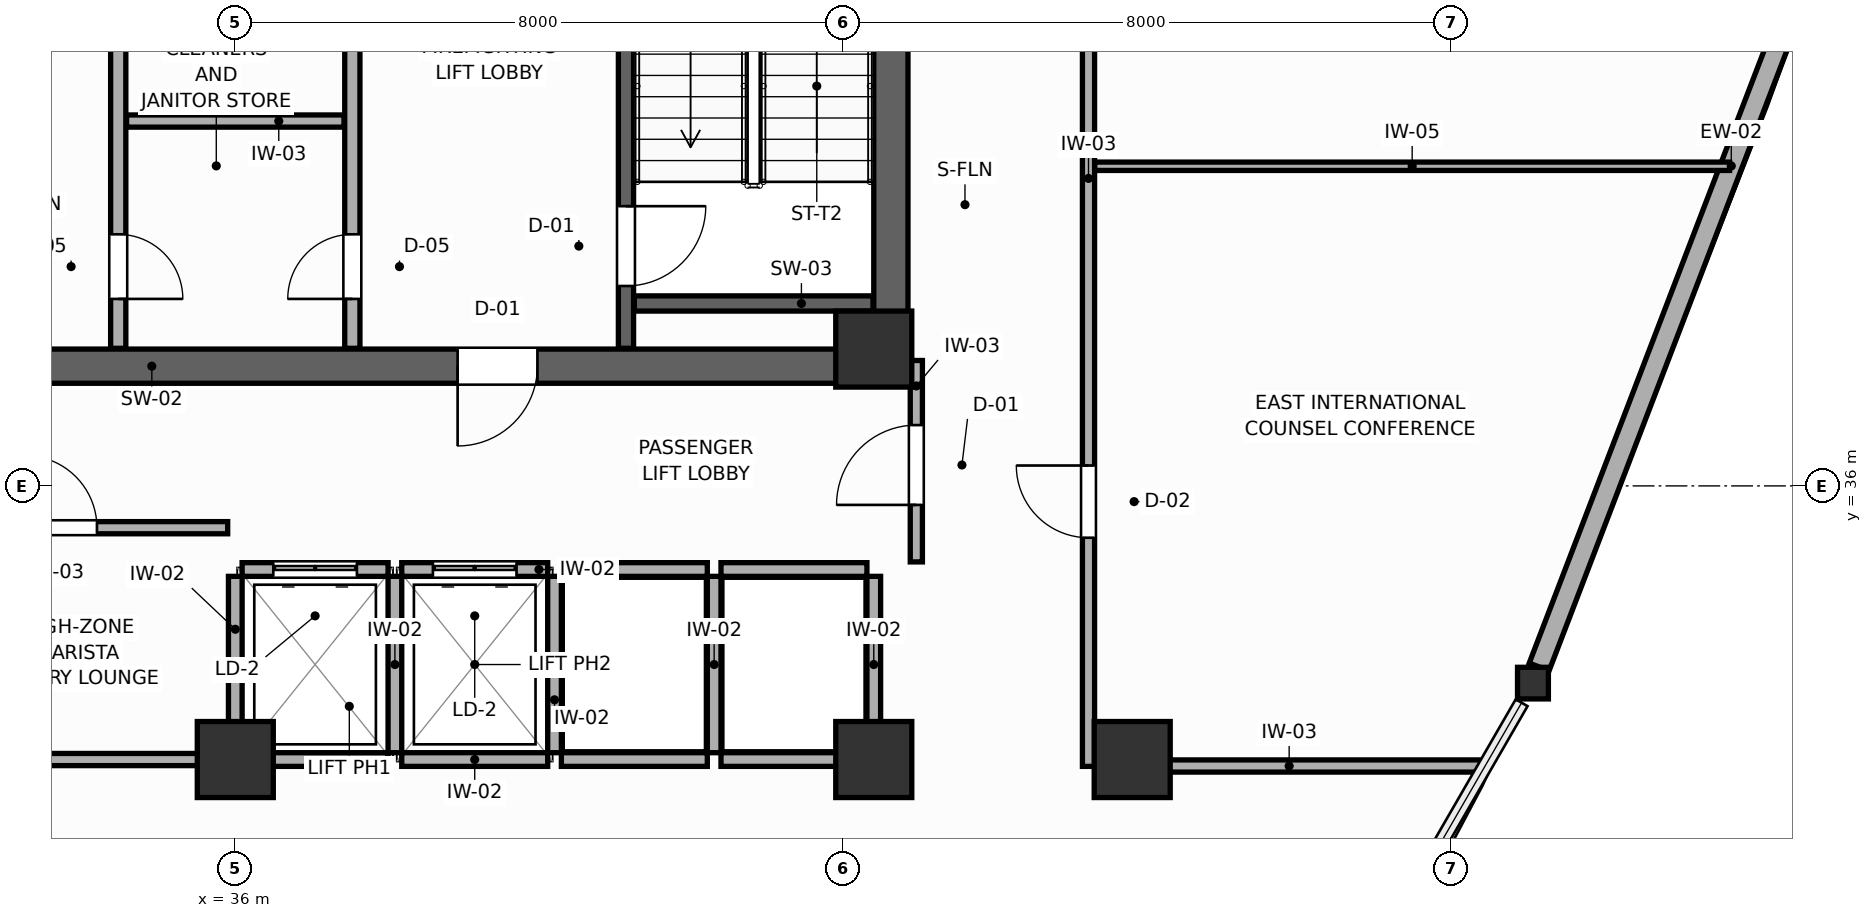
"""IFC4 building model, lengths in metres.
Left out: names, types, materials, properties, quantities, classifications, styles, units other than length and angle.
Written with IfcOpenShell. Run it as: python <this file> out.ifc"""

import sys

from ifc_helpers import new_model, si_unit, direction, frame, frame_2d, origin, origin_2d, place, context, subcontext, project, spatial, rectangle, i_section, extrude, source, transform, mapped, element, fill, save


model = new_model("IFC4")
c1 = context("Model", 3, precision=1e-05, world=origin(), true_north=direction((0.0, 1.0)))
c2 = subcontext(c1, "Body", "Model", "MODEL_VIEW")
j1 = project(units=[si_unit("LENGTHUNIT", "METRE"), si_unit("PLANEANGLEUNIT", "RADIAN")], contexts=[c1])
p1 = place(None, origin())
s1 = spatial("IfcSite", under=j1, at=p1, CompositionType="ELEMENT")
p2 = place(p1, origin())
s2 = spatial("IfcBuilding", under=s1, at=p2, CompositionType="ELEMENT")
p3 = place(p2, frame((0.0, 0.0, 179.4)))
s3 = spatial("IfcBuildingStorey", under=s2, at=p3, CompositionType="ELEMENT", Elevation=179.4)
p4 = place(p3, frame((27.15, 37.575, 0.0), z_axis=(0.0, 0.0, 1.0), x_axis=(1.0, 0.0, 0.0)))
e1 = element("IfcWall", 1, at=p4, inside=s3, PredefinedType="SHEAR", context=c2, shape_type="SweptSolid", body=[
    extrude(rectangle(XDim=17.7, YDim=0.45, at=frame_2d((8.85, 0.0))), origin(), (0.0, 0.0, 1.0), 3.6),
])
p5 = place(p4, frame((4.875, 0.0, 0.0)))
e2 = element("IfcOpeningElement", 2, at=p5, cuts=e1, PredefinedType="OPENING", context=c2, shape_type="SweptSolid", body=[
    extrude(rectangle(XDim=1.05, YDim=2.1, at=frame_2d((0.525, 1.05))), frame((0.0, 0.235, 0.0), z_axis=(0.0, -1.0, 0.0), x_axis=(1.0, 0.0, 0.0)), (0.0, 0.0, 1.0), 0.47),
])
p6 = place(p4, frame((11.775, 0.0, 0.0)))
e3 = element("IfcOpeningElement", 3, at=p6, cuts=e1, PredefinedType="OPENING", context=c2, shape_type="SweptSolid", body=[
    extrude(rectangle(XDim=1.05, YDim=2.1, at=frame_2d((0.525, 1.05))), frame((0.0, 0.235, 0.0), z_axis=(0.0, -1.0, 0.0), x_axis=(1.0, 0.0, 0.0)), (0.0, 0.0, 1.0), 0.47),
])
p7 = place(p3, frame((44.625, 37.8, 0.0), z_axis=(0.0, 0.0, 1.0), x_axis=(0.0, 1.0, 0.0)))
e4 = element("IfcWall", 4, at=p7, inside=s3, PredefinedType="SHEAR", context=c2, shape_type="SweptSolid", body=[
    extrude(rectangle(XDim=9.0, YDim=0.45, at=frame_2d((4.5, 0.0))), origin(), (0.0, 0.0, 1.0), 3.6),
])
m1 = source(origin(), c2, "Body", "SweptSolid", [
    extrude(rectangle(XDim=1.0, YDim=1.0, at=origin_2d()), origin(), (0.0, 0.0, 1.0), 3.6),
])
for number, where, z_axis, x_axis in (
    (5, (44.4, 37.8, 0.0), (0.0, 0.0, 1.0), (1.0, 0.0, 0.0)),
    (6, (44.4, 32.4, 0.0), (0.0, 0.0, 1.0), (1.0, 0.0, 0.0)),
    (7, (36.0, 32.4, 0.0), (0.0, 0.0, 1.0), (1.0, 0.0, 0.0)),
    (8, (47.8, 32.4, 0.0), (0.0, 0.0, 1.0), (1.0, 0.0, 0.0)),
):
    element("IfcColumn", number, at=place(p3, frame(where, z_axis=z_axis, x_axis=x_axis)), inside=s3, PredefinedType="COLUMN", context=c2, shape_type="MappedRepresentation", body=[
        mapped(m1, transform((0.0, 0.0, 0.0), scale=1.0)),
    ])
m2 = source(origin(), c2, "Body", "SweptSolid", [
    extrude(i_section(OverallWidth=0.406, OverallDepth=0.416, WebThickness=0.027, FlangeThickness=0.044, FilletRadius=0.015, at=origin_2d()), origin(), (0.0, 0.0, 1.0), 3.6),
])
p8 = place(p3, frame((53.073, 33.406, 0.0), z_axis=(0.0, 0.0, 1.0), x_axis=(1.0, 0.0, 0.0)))
e9 = element("IfcColumn", 9, at=p8, inside=s3, PredefinedType="COLUMN", context=c2, shape_type="MappedRepresentation", body=[
    mapped(m2, transform((0.0, 0.0, 0.0), scale=1.0)),
])
p9 = place(p3, frame((53.154, 33.618, 0.0), z_axis=(0.0, 0.0, 1.0), x_axis=(0.358033263681, 0.933708831541, 0.0)))
e10 = element("IfcWall", 10, at=p9, inside=s3, PredefinedType="SOLIDWALL", context=c2, shape_type="SweptSolid", body=[
    extrude(rectangle(XDim=14.117, YDim=0.28, at=frame_2d((7.059, 0.0))), origin(), (0.0, 0.0, 1.0), 1.87),
])
p10 = place(p3, frame((41.14, 37.81, 0.0), z_axis=(0.0, 0.0, 1.0), x_axis=(0.0, 1.0, 0.0)))
e11 = element("IfcWall", 11, at=p10, inside=s3, PredefinedType="SHEAR", context=c2, shape_type="SweptSolid", body=[
    extrude(rectangle(XDim=8.98, YDim=0.2, at=frame_2d((4.49, 0.0))), origin(), (0.0, 0.0, 1.0), 3.6),
])
p11 = place(p10, frame((0.82, 0.0, 0.0)))
e12 = element("IfcOpeningElement", 12, at=p11, cuts=e11, PredefinedType="OPENING", context=c2, shape_type="SweptSolid", body=[
    extrude(rectangle(XDim=1.05, YDim=2.1, at=frame_2d((0.525, 1.05))), frame((0.0, 0.11, 0.0), z_axis=(0.0, -1.0, 0.0), x_axis=(1.0, 0.0, 0.0)), (0.0, 0.0, 1.0), 0.22),
])
p12 = place(p3, frame((41.25, 38.4, 0.0), z_axis=(0.0, 0.0, 1.0), x_axis=(1.0, 0.0, 0.0)))
e13 = element("IfcWall", 13, at=p12, inside=s3, PredefinedType="SHEAR", context=c2, shape_type="SweptSolid", body=[
    extrude(rectangle(XDim=3.14, YDim=0.2, at=frame_2d((1.57, 0.0))), origin(), (0.0, 0.0, 1.0), 3.6),
])
p13 = place(p3, frame((34.46, 37.81, 0.0), z_axis=(0.0, 0.0, 1.0), x_axis=(0.0, 1.0, 0.0)))
e14 = element("IfcWall", 14, at=p13, inside=s3, PredefinedType="PARTITIONING", context=c2, shape_type="SweptSolid", body=[
    extrude(rectangle(XDim=8.98, YDim=0.2, at=frame_2d((4.49, 0.0))), origin(), (0.0, 0.0, 1.0), 3.4),
])
p14 = place(p13, frame((0.65, 0.0, 0.0)))
e15 = element("IfcOpeningElement", 15, at=p14, cuts=e14, PredefinedType="OPENING", context=c2, shape_type="SweptSolid", body=[
    extrude(rectangle(XDim=0.85, YDim=2.05, at=frame_2d((0.425, 1.025))), frame((0.0, 0.11, 0.0), z_axis=(0.0, -1.0, 0.0), x_axis=(1.0, 0.0, 0.0)), (0.0, 0.0, 1.0), 0.22),
])
p15 = place(p3, frame((37.54, 37.81, 0.0), z_axis=(0.0, 0.0, 1.0), x_axis=(0.0, 1.0, 0.0)))
e16 = element("IfcWall", 16, at=p15, inside=s3, PredefinedType="PARTITIONING", context=c2, shape_type="SweptSolid", body=[
    extrude(rectangle(XDim=8.98, YDim=0.2, at=frame_2d((4.49, 0.0))), origin(), (0.0, 0.0, 1.0), 3.4),
])
p16 = place(p15, frame((0.65, 0.0, 0.0)))
e17 = element("IfcOpeningElement", 17, at=p16, cuts=e16, PredefinedType="OPENING", context=c2, shape_type="SweptSolid", body=[
    extrude(rectangle(XDim=0.85, YDim=2.05, at=frame_2d((0.425, 1.025))), frame((0.0, 0.11, 0.0), z_axis=(0.0, -1.0, 0.0), x_axis=(1.0, 0.0, 0.0)), (0.0, 0.0, 1.0), 0.22),
])
p17 = place(p3, frame((34.57, 40.8, 0.0), z_axis=(0.0, 0.0, 1.0), x_axis=(1.0, 0.0, 0.0)))
e18 = element("IfcWall", 18, at=p17, inside=s3, PredefinedType="PARTITIONING", context=c2, shape_type="SweptSolid", body=[
    extrude(rectangle(XDim=2.86, YDim=0.16, at=frame_2d((1.43, 0.0))), origin(), (0.0, 0.0, 1.0), 3.4),
])
p18 = place(p3, frame((36.09, 34.9, 0.0), z_axis=(0.0, 0.0, 1.0), x_axis=(1.0, 0.0, 0.0)))
e19 = element("IfcWall", 19, at=p18, inside=s3, PredefinedType="PARTITIONING", context=c2, shape_type="SweptSolid", body=[
    extrude(rectangle(XDim=1.92, YDim=0.18, at=frame_2d((0.96, 0.0))), origin(), (0.0, 0.0, 1.0), 3.4),
])
p19 = place(p18, frame((0.41, 0.0, 0.0)))
e20 = element("IfcOpeningElement", 20, at=p19, cuts=e19, PredefinedType="OPENING", context=c2, shape_type="SweptSolid", body=[
    extrude(rectangle(XDim=1.1, YDim=2.1, at=frame_2d((0.55, 1.05))), frame((0.0, 0.1, 0.0), z_axis=(0.0, -1.0, 0.0), x_axis=(1.0, 0.0, 0.0)), (0.0, 0.0, 1.0), 0.2),
])
p20 = place(p3, frame((36.09, 32.4, 0.0), z_axis=(0.0, 0.0, 1.0), x_axis=(1.0, 0.0, 0.0)))
e21 = element("IfcWall", 21, at=p20, inside=s3, PredefinedType="PARTITIONING", context=c2, shape_type="SweptSolid", body=[
    extrude(rectangle(XDim=1.92, YDim=0.18, at=frame_2d((0.96, 0.0))), origin(), (0.0, 0.0, 1.0), 2.16),
])
p21 = place(p3, frame((36.0, 32.49, 0.0), z_axis=(0.0, 0.0, 1.0), x_axis=(0.0, 1.0, 0.0)))
e22 = element("IfcWall", 22, at=p21, inside=s3, PredefinedType="PARTITIONING", context=c2, shape_type="SweptSolid", body=[
    extrude(rectangle(XDim=2.32, YDim=0.18, at=frame_2d((1.16, 0.0))), origin(), (0.0, 0.0, 1.0), 3.4),
])
p22 = place(p3, frame((38.19, 34.9, 0.0), z_axis=(0.0, 0.0, 1.0), x_axis=(1.0, 0.0, 0.0)))
e23 = element("IfcWall", 23, at=p22, inside=s3, PredefinedType="PARTITIONING", context=c2, shape_type="SweptSolid", body=[
    extrude(rectangle(XDim=1.92, YDim=0.18, at=frame_2d((0.96, 0.0))), origin(), (0.0, 0.0, 1.0), 3.4),
])
p23 = place(p22, frame((0.41, 0.0, 0.0)))
e24 = element("IfcOpeningElement", 24, at=p23, cuts=e23, PredefinedType="OPENING", context=c2, shape_type="SweptSolid", body=[
    extrude(rectangle(XDim=1.1, YDim=2.1, at=frame_2d((0.55, 1.05))), frame((0.0, 0.1, 0.0), z_axis=(0.0, -1.0, 0.0), x_axis=(1.0, 0.0, 0.0)), (0.0, 0.0, 1.0), 0.2),
])
p24 = place(p3, frame((38.19, 32.4, 0.0), z_axis=(0.0, 0.0, 1.0), x_axis=(1.0, 0.0, 0.0)))
e25 = element("IfcWall", 25, at=p24, inside=s3, PredefinedType="PARTITIONING", context=c2, shape_type="SweptSolid", body=[
    extrude(rectangle(XDim=1.92, YDim=0.18, at=frame_2d((0.96, 0.0))), origin(), (0.0, 0.0, 1.0), 2.16),
])
p25 = place(p3, frame((38.1, 32.49, 0.0), z_axis=(0.0, 0.0, 1.0), x_axis=(0.0, 1.0, 0.0)))
e26 = element("IfcWall", 26, at=p25, inside=s3, PredefinedType="PARTITIONING", context=c2, shape_type="SweptSolid", body=[
    extrude(rectangle(XDim=2.32, YDim=0.18, at=frame_2d((1.16, 0.0))), origin(), (0.0, 0.0, 1.0), 3.4),
])
p26 = place(p3, frame((40.29, 34.9, 0.0), z_axis=(0.0, 0.0, 1.0), x_axis=(1.0, 0.0, 0.0)))
e27 = element("IfcWall", 27, at=p26, inside=s3, PredefinedType="PARTITIONING", context=c2, shape_type="SweptSolid", body=[
    extrude(rectangle(XDim=1.92, YDim=0.18, at=frame_2d((0.96, 0.0))), origin(), (0.0, 0.0, 1.0), 3.4),
])
p27 = place(p3, frame((40.29, 32.4, 0.0), z_axis=(0.0, 0.0, 1.0), x_axis=(1.0, 0.0, 0.0)))
e28 = element("IfcWall", 28, at=p27, inside=s3, PredefinedType="PARTITIONING", context=c2, shape_type="SweptSolid", body=[
    extrude(rectangle(XDim=1.92, YDim=0.18, at=frame_2d((0.96, 0.0))), origin(), (0.0, 0.0, 1.0), 2.16),
])
p28 = place(p3, frame((40.2, 32.49, 0.0), z_axis=(0.0, 0.0, 1.0), x_axis=(0.0, 1.0, 0.0)))
e29 = element("IfcWall", 29, at=p28, inside=s3, PredefinedType="PARTITIONING", context=c2, shape_type="SweptSolid", body=[
    extrude(rectangle(XDim=2.32, YDim=0.18, at=frame_2d((1.16, 0.0))), origin(), (0.0, 0.0, 1.0), 3.4),
])
p29 = place(p3, frame((42.39, 34.9, 0.0), z_axis=(0.0, 0.0, 1.0), x_axis=(1.0, 0.0, 0.0)))
e30 = element("IfcWall", 30, at=p29, inside=s3, PredefinedType="PARTITIONING", context=c2, shape_type="SweptSolid", body=[
    extrude(rectangle(XDim=1.92, YDim=0.18, at=frame_2d((0.96, 0.0))), origin(), (0.0, 0.0, 1.0), 3.4),
])
p30 = place(p3, frame((42.39, 32.4, 0.0), z_axis=(0.0, 0.0, 1.0), x_axis=(1.0, 0.0, 0.0)))
e31 = element("IfcWall", 31, at=p30, inside=s3, PredefinedType="PARTITIONING", context=c2, shape_type="SweptSolid", body=[
    extrude(rectangle(XDim=1.92, YDim=0.18, at=frame_2d((0.96, 0.0))), origin(), (0.0, 0.0, 1.0), 2.16),
])
for number, where, z_axis, x_axis in (
    (32, (42.3, 32.49, 0.0), (0.0, 0.0, 1.0), (0.0, 1.0, 0.0)),
    (33, (44.4, 32.49, 0.0), (0.0, 0.0, 1.0), (0.0, 1.0, 0.0)),
):
    element("IfcWall", number, at=place(p3, frame(where, z_axis=z_axis, x_axis=x_axis)), inside=s3, PredefinedType="PARTITIONING", context=c2, shape_type="SweptSolid", body=[
        extrude(rectangle(XDim=2.32, YDim=0.18, at=frame_2d((1.16, 0.0))), origin(), (0.0, 0.0, 1.0), 3.4),
    ])
p31 = place(p3, frame((28.25, 32.4, 0.0), z_axis=(0.0, 0.0, 1.0), x_axis=(1.0, 0.0, 0.0)))
e34 = element("IfcWall", 34, at=p31, inside=s3, PredefinedType="PARTITIONING", context=c2, shape_type="SweptSolid", body=[
    extrude(rectangle(XDim=7.65, YDim=0.16, at=frame_2d((3.825, 0.0))), origin(), (0.0, 0.0, 1.0), 2.16),
])
p32 = place(p3, frame((31.88, 35.45, 0.0), z_axis=(0.0, 0.0, 1.0), x_axis=(1.0, 0.0, 0.0)))
e35 = element("IfcWall", 35, at=p32, inside=s3, PredefinedType="PARTITIONING", context=c2, shape_type="SweptSolid", body=[
    extrude(rectangle(XDim=4.02, YDim=0.16, at=frame_2d((2.01, 0.0))), origin(), (0.0, 0.0, 1.0), 3.4),
])
p33 = place(p32, frame((1.35, 0.0, 0.0)))
e36 = element("IfcOpeningElement", 36, at=p33, cuts=e35, PredefinedType="OPENING", context=c2, shape_type="SweptSolid", body=[
    extrude(rectangle(XDim=0.95, YDim=2.05, at=frame_2d((0.475, 1.025))), frame((0.0, 0.09, 0.0), z_axis=(0.0, -1.0, 0.0), x_axis=(1.0, 0.0, 0.0)), (0.0, 0.0, 1.0), 0.18),
])
p34 = place(p3, frame((44.96, 35.0, 0.0), z_axis=(0.0, 0.0, 1.0), x_axis=(0.0, 1.0, 0.0)))
e37 = element("IfcWall", 37, at=p34, inside=s3, PredefinedType="PARTITIONING", context=c2, shape_type="SweptSolid", body=[
    extrude(rectangle(XDim=2.65, YDim=0.16, at=frame_2d((1.325, 0.0))), origin(), (0.0, 0.0, 1.0), 3.4),
])
p35 = place(p34, frame((0.75, 0.0, 0.0)))
e38 = element("IfcOpeningElement", 38, at=p35, cuts=e37, PredefinedType="OPENING", context=c2, shape_type="SweptSolid", body=[
    extrude(rectangle(XDim=1.05, YDim=2.1, at=frame_2d((0.525, 1.05))), frame((0.0, 0.09, 0.0), z_axis=(0.0, -1.0, 0.0), x_axis=(1.0, 0.0, 0.0)), (0.0, 0.0, 1.0), 0.18),
])
p36 = place(p3, frame((47.225, 32.31, 0.0), z_axis=(0.0, 0.0, 1.0), x_axis=(0.0, 1.0, 0.0)))
e39 = element("IfcWall", 39, at=p36, inside=s3, PredefinedType="PARTITIONING", context=c2, shape_type="SweptSolid", body=[
    extrude(rectangle(XDim=18.969, YDim=0.16, at=frame_2d((9.484, 0.0))), origin(), (0.0, 0.0, 1.0), 3.4),
])
p37 = place(p36, frame((3.008, 0.0, 0.0)))
e40 = element("IfcOpeningElement", 40, at=p37, cuts=e39, PredefinedType="OPENING", context=c2, shape_type="SweptSolid", body=[
    extrude(rectangle(XDim=0.95, YDim=2.05, at=frame_2d((0.475, 1.025))), frame((0.0, 0.09, 0.0), z_axis=(0.0, -1.0, 0.0), x_axis=(1.0, 0.0, 0.0)), (0.0, 0.0, 1.0), 0.18),
])
p38 = place(p36, frame((11.513, 0.0, 0.0)))
e41 = element("IfcOpeningElement", 41, at=p38, cuts=e39, PredefinedType="OPENING", context=c2, shape_type="SweptSolid", body=[
    extrude(rectangle(XDim=0.95, YDim=2.05, at=frame_2d((0.475, 1.025))), frame((0.0, 0.09, 0.0), z_axis=(0.0, -1.0, 0.0), x_axis=(1.0, 0.0, 0.0)), (0.0, 0.0, 1.0), 0.18),
])
p39 = place(p3, frame((47.307, 32.315, 0.0), z_axis=(0.0, 0.0, 1.0), x_axis=(1.0, 0.0, 0.0)))
e42 = element("IfcWall", 42, at=p39, inside=s3, PredefinedType="PARTITIONING", context=c2, shape_type="SweptSolid", body=[
    extrude(rectangle(XDim=5.116, YDim=0.16, at=frame_2d((2.558, 0.0))), origin(), (0.0, 0.0, 1.0), 2.16),
])
p40 = place(p3, frame((47.307, 40.205, 0.0), z_axis=(0.0, 0.0, 1.0), x_axis=(1.0, 0.0, 0.0)))
e43 = element("IfcWall", 43, at=p40, inside=s3, PredefinedType="MOVABLE", context=c2, shape_type="SweptSolid", body=[
    extrude(rectangle(XDim=8.353, YDim=0.11, at=frame_2d((4.176, 0.0))), origin(), (0.0, 0.0, 1.0), 3.4),
])
p41 = place(p11, frame((1.05, 0.0, 0.0), z_axis=(0.0, 0.0, 1.0), x_axis=(-1.0, 0.0, 0.0)))
e44 = element("IfcDoor", 44, at=p41, inside=s3, OperationType="SINGLE_SWING_LEFT", PredefinedType="DOOR", context=c2, shape_type="SweptSolid", body=[
    extrude(rectangle(XDim=1.05, YDim=2.1, at=frame_2d((0.525, 1.05))), frame((0.0, 0.025, 0.0), z_axis=(0.0, -1.0, 0.0), x_axis=(1.0, 0.0, 0.0)), (0.0, 0.0, 1.0), 0.05),
])
fill(e12, e44)
p42 = place(p14, frame((0.85, 0.0, 0.0), z_axis=(0.0, 0.0, 1.0), x_axis=(-1.0, 0.0, 0.0)))
e45 = element("IfcDoor", 45, at=p42, inside=s3, OperationType="SINGLE_SWING_RIGHT", PredefinedType="DOOR", context=c2, shape_type="SweptSolid", body=[
    extrude(rectangle(XDim=0.85, YDim=2.05, at=frame_2d((0.425, 1.025))), frame((0.0, 0.025, 0.0), z_axis=(0.0, -1.0, 0.0), x_axis=(1.0, 0.0, 0.0)), (0.0, 0.0, 1.0), 0.05),
])
fill(e15, e45)
p43 = place(p16, origin())
e46 = element("IfcDoor", 46, at=p43, inside=s3, OperationType="SINGLE_SWING_LEFT", PredefinedType="DOOR", context=c2, shape_type="SweptSolid", body=[
    extrude(rectangle(XDim=0.85, YDim=2.05, at=frame_2d((0.425, 1.025))), frame((0.0, 0.025, 0.0), z_axis=(0.0, -1.0, 0.0), x_axis=(1.0, 0.0, 0.0)), (0.0, 0.0, 1.0), 0.05),
])
fill(e17, e46)
p44 = place(p19, origin())
e47 = element("IfcDoor", 47, at=p44, inside=s3, OperationType="DOUBLE_DOOR_SLIDING", PredefinedType="DOOR", context=c2, shape_type="SweptSolid", body=[
    extrude(rectangle(XDim=1.1, YDim=2.1, at=frame_2d((0.55, 1.05))), frame((0.0, 0.025, 0.0), z_axis=(0.0, -1.0, 0.0), x_axis=(1.0, 0.0, 0.0)), (0.0, 0.0, 1.0), 0.05),
])
fill(e20, e47)
p45 = place(p23, origin())
e48 = element("IfcDoor", 48, at=p45, inside=s3, OperationType="DOUBLE_DOOR_SLIDING", PredefinedType="DOOR", context=c2, shape_type="SweptSolid", body=[
    extrude(rectangle(XDim=1.1, YDim=2.1, at=frame_2d((0.55, 1.05))), frame((0.0, 0.025, 0.0), z_axis=(0.0, -1.0, 0.0), x_axis=(1.0, 0.0, 0.0)), (0.0, 0.0, 1.0), 0.05),
])
fill(e24, e48)
p46 = place(p33, origin())
e49 = element("IfcDoor", 49, at=p46, inside=s3, OperationType="SINGLE_SWING_LEFT", PredefinedType="DOOR", context=c2, shape_type="SweptSolid", body=[
    extrude(rectangle(XDim=0.95, YDim=2.05, at=frame_2d((0.475, 1.025))), frame((0.0, 0.025, 0.0), z_axis=(0.0, -1.0, 0.0), x_axis=(1.0, 0.0, 0.0)), (0.0, 0.0, 1.0), 0.05),
])
fill(e36, e49)
p47 = place(p35, origin())
e50 = element("IfcDoor", 50, at=p47, inside=s3, OperationType="SINGLE_SWING_LEFT", PredefinedType="DOOR", context=c2, shape_type="SweptSolid", body=[
    extrude(rectangle(XDim=1.05, YDim=2.1, at=frame_2d((0.525, 1.05))), frame((0.0, 0.025, 0.0), z_axis=(0.0, -1.0, 0.0), x_axis=(1.0, 0.0, 0.0)), (0.0, 0.0, 1.0), 0.05),
])
fill(e38, e50)
p48 = place(p37, origin())
e51 = element("IfcDoor", 51, at=p48, inside=s3, OperationType="SINGLE_SWING_RIGHT", PredefinedType="DOOR", context=c2, shape_type="SweptSolid", body=[
    extrude(rectangle(XDim=0.95, YDim=2.05, at=frame_2d((0.475, 1.025))), frame((0.0, 0.025, 0.0), z_axis=(0.0, -1.0, 0.0), x_axis=(1.0, 0.0, 0.0)), (0.0, 0.0, 1.0), 0.05),
])
fill(e40, e51)
p49 = place(p6, frame((1.05, 0.0, 0.0), z_axis=(0.0, 0.0, 1.0), x_axis=(-1.0, 0.0, 0.0)))
e52 = element("IfcDoor", 52, at=p49, inside=s3, OperationType="SINGLE_SWING_RIGHT", PredefinedType="DOOR", context=c2, shape_type="SweptSolid", body=[
    extrude(rectangle(XDim=1.05, YDim=2.1, at=frame_2d((0.525, 1.05))), frame((0.0, 0.025, 0.0), z_axis=(0.0, -1.0, 0.0), x_axis=(1.0, 0.0, 0.0)), (0.0, 0.0, 1.0), 0.05),
])
fill(e3, e52)
save(model, sys.argv[1])
